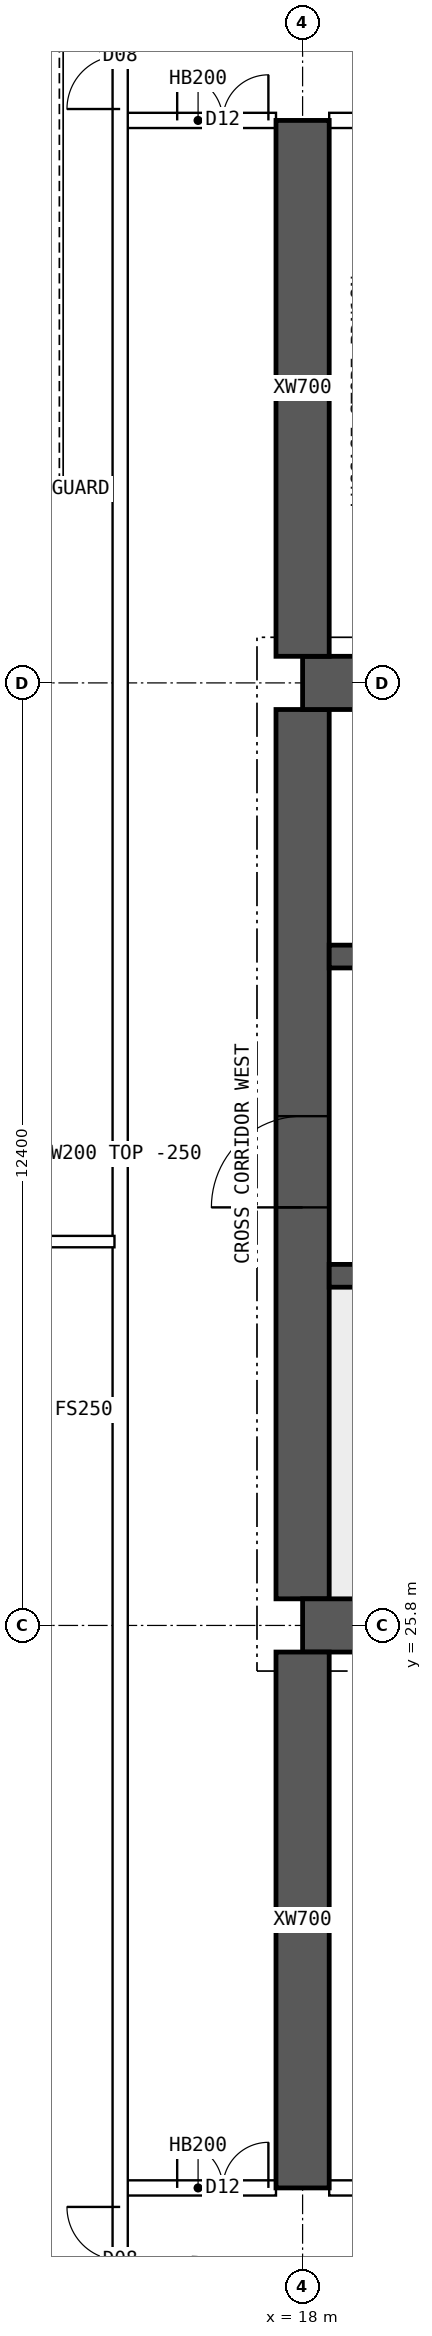
"""IFC4 building model, lengths in metres.
Left out: names, types, materials, properties, quantities, classifications, styles, units other than length and angle.
Written with IfcOpenShell. Run it as: python <this file> out.ifc"""

import sys

from ifc_helpers import new_model, si_unit, direction, frame, frame_2d, origin, place, context, subcontext, project, spatial, polyline, rectangle, outline, extrude, element, fill, save


model = new_model("IFC4")
c1 = context("Model", 3, precision=1e-05, world=origin(), true_north=direction((0.0, 1.0)))
c2 = subcontext(c1, "Body", "Model", "MODEL_VIEW")
j1 = project(units=[si_unit("LENGTHUNIT", "METRE"), si_unit("PLANEANGLEUNIT", "RADIAN")], contexts=[c1])
p1 = place(None, origin())
s1 = spatial("IfcSite", under=j1, at=p1, CompositionType="ELEMENT")
p2 = place(p1, origin())
s2 = spatial("IfcBuilding", under=s1, at=p2, CompositionType="ELEMENT")
p3 = place(p2, frame((0.0, 0.0, 250.3)))
s3 = spatial("IfcBuildingStorey", under=s2, at=p3, CompositionType="ELEMENT", Elevation=250.3)
for number, where, z_axis, x_axis in (
    (1, (18.0, 25.8, 0.0), (0.0, 0.0, 1.0), (1.0, 0.0, 0.0)),
    (2, (18.0, 38.2, 0.0), (0.0, 0.0, 1.0), (1.0, 0.0, 0.0)),
):
    element("IfcWall", number, at=place(p3, frame(where, z_axis=z_axis, x_axis=x_axis)), inside=s3, PredefinedType="SHEAR", context=c2, shape_type="SweptSolid", body=[
        extrude(rectangle(XDim=48.0, YDim=0.7, at=frame_2d((24.0, 0.0))), origin(), (0.0, 0.0, 1.0), 3.75),
    ])
p4 = place(p3, frame((18.0, 26.15, 0.0), z_axis=(0.0, 0.0, 1.0), x_axis=(0.0, 1.0, 0.0)))
e3 = element("IfcWall", 3, at=p4, inside=s3, PredefinedType="SHEAR", context=c2, shape_type="SweptSolid", body=[
    extrude(rectangle(XDim=11.7, YDim=0.7, at=frame_2d((5.85, 0.0))), origin(), (0.0, 0.0, 1.0), 3.75),
])
p5 = place(p4, frame((5.15, 0.0, 0.0)))
e4 = element("IfcOpeningElement", 4, at=p5, cuts=e3, PredefinedType="OPENING", context=c2, shape_type="SweptSolid", body=[
    extrude(rectangle(XDim=1.2, YDim=2.1, at=frame_2d((0.6, 1.05))), frame((0.0, 0.36, 0.0), z_axis=(0.0, -1.0, 0.0), x_axis=(1.0, 0.0, 0.0)), (0.0, 0.0, 1.0), 0.72),
])
p6 = place(p3, frame((18.35, 30.4, 0.0), z_axis=(0.0, 0.0, 1.0), x_axis=(1.0, 0.0, 0.0)))
e5 = element("IfcWall", 5, at=p6, inside=s3, PredefinedType="SHEAR", context=c2, shape_type="SweptSolid", body=[
    extrude(rectangle(XDim=47.3, YDim=0.3, at=frame_2d((23.65, 0.0))), origin(), (0.0, 0.0, 1.0), 3.75),
])
p7 = place(p6, frame((0.4, 0.0, 0.0)))
e6 = element("IfcOpeningElement", 6, at=p7, cuts=e5, PredefinedType="OPENING", context=c2, shape_type="SweptSolid", body=[
    extrude(rectangle(XDim=1.0, YDim=2.1, at=frame_2d((0.5, 1.05))), frame((0.0, 0.16, 0.0), z_axis=(0.0, -1.0, 0.0), x_axis=(1.0, 0.0, 0.0)), (0.0, 0.0, 1.0), 0.32),
])
p8 = place(p6, frame((45.9, 0.0, 0.0)))
e7 = element("IfcOpeningElement", 7, at=p8, cuts=e5, PredefinedType="OPENING", context=c2, shape_type="SweptSolid", body=[
    extrude(rectangle(XDim=1.0, YDim=2.1, at=frame_2d((0.5, 1.05))), frame((0.0, 0.16, 0.0), z_axis=(0.0, -1.0, 0.0), x_axis=(1.0, 0.0, 0.0)), (0.0, 0.0, 1.0), 0.32),
])
p9 = place(p6, frame((8.4, 0.0, 0.0)))
e8 = element("IfcOpeningElement", 8, at=p9, cuts=e5, PredefinedType="OPENING", context=c2, shape_type="SweptSolid", body=[
    extrude(rectangle(XDim=1.1, YDim=2.1, at=frame_2d((0.55, 1.05))), frame((0.0, 0.16, 0.0), z_axis=(0.0, -1.0, 0.0), x_axis=(1.0, 0.0, 0.0)), (0.0, 0.0, 1.0), 0.32),
])
p10 = place(p6, frame((11.0, 0.0, 0.0)))
e9 = element("IfcOpeningElement", 9, at=p10, cuts=e5, PredefinedType="OPENING", context=c2, shape_type="SweptSolid", body=[
    extrude(rectangle(XDim=1.1, YDim=2.1, at=frame_2d((0.55, 1.05))), frame((0.0, 0.16, 0.0), z_axis=(0.0, -1.0, 0.0), x_axis=(1.0, 0.0, 0.0)), (0.0, 0.0, 1.0), 0.32),
])
p11 = place(p6, frame((13.6, 0.0, 0.0)))
e10 = element("IfcOpeningElement", 10, at=p11, cuts=e5, PredefinedType="OPENING", context=c2, shape_type="SweptSolid", body=[
    extrude(rectangle(XDim=1.1, YDim=2.1, at=frame_2d((0.55, 1.05))), frame((0.0, 0.16, 0.0), z_axis=(0.0, -1.0, 0.0), x_axis=(1.0, 0.0, 0.0)), (0.0, 0.0, 1.0), 0.32),
])
p12 = place(p6, frame((16.2, 0.0, 0.0)))
e11 = element("IfcOpeningElement", 11, at=p12, cuts=e5, PredefinedType="OPENING", context=c2, shape_type="SweptSolid", body=[
    extrude(rectangle(XDim=1.1, YDim=2.1, at=frame_2d((0.55, 1.05))), frame((0.0, 0.16, 0.0), z_axis=(0.0, -1.0, 0.0), x_axis=(1.0, 0.0, 0.0)), (0.0, 0.0, 1.0), 0.32),
])
p13 = place(p6, frame((18.975, 0.0, 0.0)))
e12 = element("IfcOpeningElement", 12, at=p13, cuts=e5, PredefinedType="OPENING", context=c2, shape_type="SweptSolid", body=[
    extrude(rectangle(XDim=0.9, YDim=2.1, at=frame_2d((0.45, 1.05))), frame((0.0, 0.16, 0.0), z_axis=(0.0, -1.0, 0.0), x_axis=(1.0, 0.0, 0.0)), (0.0, 0.0, 1.0), 0.32),
])
p14 = place(p6, frame((24.475, 0.0, 0.0)))
e13 = element("IfcOpeningElement", 13, at=p14, cuts=e5, PredefinedType="OPENING", context=c2, shape_type="SweptSolid", body=[
    extrude(rectangle(XDim=0.9, YDim=2.1, at=frame_2d((0.45, 1.05))), frame((0.0, 0.16, 0.0), z_axis=(0.0, -1.0, 0.0), x_axis=(1.0, 0.0, 0.0)), (0.0, 0.0, 1.0), 0.32),
])
p15 = place(p6, frame((30.267, 0.0, 0.0)))
e14 = element("IfcOpeningElement", 14, at=p15, cuts=e5, PredefinedType="OPENING", context=c2, shape_type="SweptSolid", body=[
    extrude(rectangle(XDim=1.1, YDim=2.1, at=frame_2d((0.55, 1.05))), frame((0.0, 0.16, 0.0), z_axis=(0.0, -1.0, 0.0), x_axis=(1.0, 0.0, 0.0)), (0.0, 0.0, 1.0), 0.32),
])
p16 = place(p6, frame((33.8, 0.0, 0.0)))
e15 = element("IfcOpeningElement", 15, at=p16, cuts=e5, PredefinedType="OPENING", context=c2, shape_type="SweptSolid", body=[
    extrude(rectangle(XDim=1.1, YDim=2.1, at=frame_2d((0.55, 1.05))), frame((0.0, 0.16, 0.0), z_axis=(0.0, -1.0, 0.0), x_axis=(1.0, 0.0, 0.0)), (0.0, 0.0, 1.0), 0.32),
])
p17 = place(p6, frame((37.333, 0.0, 0.0)))
e16 = element("IfcOpeningElement", 16, at=p17, cuts=e5, PredefinedType="OPENING", context=c2, shape_type="SweptSolid", body=[
    extrude(rectangle(XDim=1.1, YDim=2.1, at=frame_2d((0.55, 1.05))), frame((0.0, 0.16, 0.0), z_axis=(0.0, -1.0, 0.0), x_axis=(1.0, 0.0, 0.0)), (0.0, 0.0, 1.0), 0.32),
])
p18 = place(p3, frame((18.35, 34.6, 0.0), z_axis=(0.0, 0.0, 1.0), x_axis=(1.0, 0.0, 0.0)))
e17 = element("IfcWall", 17, at=p18, inside=s3, PredefinedType="SHEAR", context=c2, shape_type="SweptSolid", body=[
    extrude(rectangle(XDim=47.3, YDim=0.3, at=frame_2d((23.65, 0.0))), origin(), (0.0, 0.0, 1.0), 3.75),
])
p19 = place(p18, frame((0.9, 0.0, 0.0)))
e18 = element("IfcOpeningElement", 18, at=p19, cuts=e17, PredefinedType="OPENING", context=c2, shape_type="SweptSolid", body=[
    extrude(rectangle(XDim=1.1, YDim=2.1, at=frame_2d((0.55, 1.05))), frame((0.0, 0.16, 0.0), z_axis=(0.0, -1.0, 0.0), x_axis=(1.0, 0.0, 0.0)), (0.0, 0.0, 1.0), 0.32),
])
p20 = place(p18, frame((45.3, 0.0, 0.0)))
e19 = element("IfcOpeningElement", 19, at=p20, cuts=e17, PredefinedType="OPENING", context=c2, shape_type="SweptSolid", body=[
    extrude(rectangle(XDim=1.1, YDim=2.1, at=frame_2d((0.55, 1.05))), frame((0.0, 0.16, 0.0), z_axis=(0.0, -1.0, 0.0), x_axis=(1.0, 0.0, 0.0)), (0.0, 0.0, 1.0), 0.32),
])
p21 = place(p18, frame((4.25, 0.0, 0.0)))
e20 = element("IfcOpeningElement", 20, at=p21, cuts=e17, PredefinedType="OPENING", context=c2, shape_type="SweptSolid", body=[
    extrude(rectangle(XDim=0.9, YDim=2.1, at=frame_2d((0.45, 1.05))), frame((0.0, 0.16, 0.0), z_axis=(0.0, -1.0, 0.0), x_axis=(1.0, 0.0, 0.0)), (0.0, 0.0, 1.0), 0.32),
])
p22 = place(p18, frame((42.15, 0.0, 0.0)))
e21 = element("IfcOpeningElement", 21, at=p22, cuts=e17, PredefinedType="OPENING", context=c2, shape_type="SweptSolid", body=[
    extrude(rectangle(XDim=0.9, YDim=2.1, at=frame_2d((0.45, 1.05))), frame((0.0, 0.16, 0.0), z_axis=(0.0, -1.0, 0.0), x_axis=(1.0, 0.0, 0.0)), (0.0, 0.0, 1.0), 0.32),
])
p23 = place(p18, frame((9.025, 0.0, 0.0)))
e22 = element("IfcOpeningElement", 22, at=p23, cuts=e17, PredefinedType="OPENING", context=c2, shape_type="SweptSolid", body=[
    extrude(rectangle(XDim=0.9, YDim=2.1, at=frame_2d((0.45, 1.05))), frame((0.0, 0.16, 0.0), z_axis=(0.0, -1.0, 0.0), x_axis=(1.0, 0.0, 0.0)), (0.0, 0.0, 1.0), 0.32),
])
p24 = place(p18, frame((12.999, 0.0, 0.0)))
e23 = element("IfcOpeningElement", 23, at=p24, cuts=e17, PredefinedType="OPENING", context=c2, shape_type="SweptSolid", body=[
    extrude(rectangle(XDim=0.9, YDim=2.1, at=frame_2d((0.45, 1.05))), frame((0.0, 0.16, 0.0), z_axis=(0.0, -1.0, 0.0), x_axis=(1.0, 0.0, 0.0)), (0.0, 0.0, 1.0), 0.32),
])
p25 = place(p18, frame((16.646, 0.0, 0.0)))
e24 = element("IfcOpeningElement", 24, at=p25, cuts=e17, PredefinedType="OPENING", context=c2, shape_type="SweptSolid", body=[
    extrude(rectangle(XDim=0.9, YDim=2.1, at=frame_2d((0.45, 1.05))), frame((0.0, 0.16, 0.0), z_axis=(0.0, -1.0, 0.0), x_axis=(1.0, 0.0, 0.0)), (0.0, 0.0, 1.0), 0.32),
])
p26 = place(p18, frame((20.405, 0.0, 0.0)))
e25 = element("IfcOpeningElement", 25, at=p26, cuts=e17, PredefinedType="OPENING", context=c2, shape_type="SweptSolid", body=[
    extrude(rectangle(XDim=0.9, YDim=2.1, at=frame_2d((0.45, 1.05))), frame((0.0, 0.16, 0.0), z_axis=(0.0, -1.0, 0.0), x_axis=(1.0, 0.0, 0.0)), (0.0, 0.0, 1.0), 0.32),
])
p27 = place(p18, frame((24.811, 0.0, 0.0)))
e26 = element("IfcOpeningElement", 26, at=p27, cuts=e17, PredefinedType="OPENING", context=c2, shape_type="SweptSolid", body=[
    extrude(rectangle(XDim=0.9, YDim=2.1, at=frame_2d((0.45, 1.05))), frame((0.0, 0.16, 0.0), z_axis=(0.0, -1.0, 0.0), x_axis=(1.0, 0.0, 0.0)), (0.0, 0.0, 1.0), 0.32),
])
p28 = place(p18, frame((27.608, 0.0, 0.0)))
e27 = element("IfcOpeningElement", 27, at=p28, cuts=e17, PredefinedType="OPENING", context=c2, shape_type="SweptSolid", body=[
    extrude(rectangle(XDim=0.9, YDim=2.1, at=frame_2d((0.45, 1.05))), frame((0.0, 0.16, 0.0), z_axis=(0.0, -1.0, 0.0), x_axis=(1.0, 0.0, 0.0)), (0.0, 0.0, 1.0), 0.32),
])
p29 = place(p18, frame((29.981, 0.0, 0.0)))
e28 = element("IfcOpeningElement", 28, at=p29, cuts=e17, PredefinedType="OPENING", context=c2, shape_type="SweptSolid", body=[
    extrude(rectangle(XDim=0.9, YDim=2.1, at=frame_2d((0.45, 1.05))), frame((0.0, 0.16, 0.0), z_axis=(0.0, -1.0, 0.0), x_axis=(1.0, 0.0, 0.0)), (0.0, 0.0, 1.0), 0.32),
])
p30 = place(p18, frame((35.451, 0.0, 0.0)))
e29 = element("IfcOpeningElement", 29, at=p30, cuts=e17, PredefinedType="OPENING", context=c2, shape_type="SweptSolid", body=[
    extrude(rectangle(XDim=0.9, YDim=2.1, at=frame_2d((0.45, 1.05))), frame((0.0, 0.16, 0.0), z_axis=(0.0, -1.0, 0.0), x_axis=(1.0, 0.0, 0.0)), (0.0, 0.0, 1.0), 0.32),
])
for number, where, z_axis, x_axis in (
    (30, (18.0, 18.4, 0.0), (0.0, 0.0, 1.0), (0.0, 1.0, 0.0)),
    (31, (18.0, 38.55, 0.0), (0.0, 0.0, 1.0), (0.0, 1.0, 0.0)),
):
    element("IfcWall", number, at=place(p3, frame(where, z_axis=z_axis, x_axis=x_axis)), inside=s3, PredefinedType="SHEAR", context=c2, shape_type="SweptSolid", body=[
        extrude(rectangle(XDim=7.05, YDim=0.7, at=frame_2d((3.525, 0.0))), origin(), (0.0, 0.0, 1.0), 3.75),
    ])
p31 = place(p3, frame((15.6, 18.4, 0.0), z_axis=(0.0, 0.0, 1.0), x_axis=(1.0, 0.0, 0.0)))
e32 = element("IfcWall", 32, at=p31, inside=s3, PredefinedType="SOLIDWALL", context=c2, shape_type="SweptSolid", body=[
    extrude(rectangle(XDim=2.05, YDim=0.2, at=frame_2d((1.025, 0.0))), origin(), (0.0, 0.0, 1.0), 3.5),
])
p32 = place(p31, frame((0.75, 0.0, 0.0)))
e33 = element("IfcOpeningElement", 33, at=p32, cuts=e32, PredefinedType="OPENING", context=c2, shape_type="SweptSolid", body=[
    extrude(rectangle(XDim=1.2, YDim=2.1, at=frame_2d((0.6, 1.05))), frame((0.0, 0.11, 0.0), z_axis=(0.0, -1.0, 0.0), x_axis=(1.0, 0.0, 0.0)), (0.0, 0.0, 1.0), 0.22),
])
p33 = place(p3, frame((18.35, 18.4, 0.0), z_axis=(0.0, 0.0, 1.0), x_axis=(1.0, 0.0, 0.0)))
e34 = element("IfcWall", 34, at=p33, inside=s3, PredefinedType="SOLIDWALL", context=c2, shape_type="SweptSolid", body=[
    extrude(rectangle(XDim=5.3, YDim=0.2, at=frame_2d((2.65, 0.0))), origin(), (0.0, 0.0, 1.0), 3.5),
])
p34 = place(p33, frame((0.35, 0.0, 0.0)))
e35 = element("IfcOpeningElement", 35, at=p34, cuts=e34, PredefinedType="OPENING", context=c2, shape_type="SweptSolid", body=[
    extrude(rectangle(XDim=0.9, YDim=2.1, at=frame_2d((0.45, 1.05))), frame((0.0, 0.11, 0.0), z_axis=(0.0, -1.0, 0.0), x_axis=(1.0, 0.0, 0.0)), (0.0, 0.0, 1.0), 0.22),
])
p35 = place(p33, frame((3.185, 0.0, 0.0)))
e36 = element("IfcOpeningElement", 36, at=p35, cuts=e34, PredefinedType="OPENING", context=c2, shape_type="SweptSolid", body=[
    extrude(rectangle(XDim=0.9, YDim=2.1, at=frame_2d((0.45, 1.05))), frame((0.0, 0.11, 0.0), z_axis=(0.0, -1.0, 0.0), x_axis=(1.0, 0.0, 0.0)), (0.0, 0.0, 1.0), 0.22),
])
p36 = place(p3, frame((15.6, 45.6, 0.0), z_axis=(0.0, 0.0, 1.0), x_axis=(1.0, 0.0, 0.0)))
e37 = element("IfcWall", 37, at=p36, inside=s3, PredefinedType="SOLIDWALL", context=c2, shape_type="SweptSolid", body=[
    extrude(rectangle(XDim=2.05, YDim=0.2, at=frame_2d((1.025, 0.0))), origin(), (0.0, 0.0, 1.0), 3.5),
])
p37 = place(p36, frame((0.75, 0.0, 0.0)))
e38 = element("IfcOpeningElement", 38, at=p37, cuts=e37, PredefinedType="OPENING", context=c2, shape_type="SweptSolid", body=[
    extrude(rectangle(XDim=1.2, YDim=2.1, at=frame_2d((0.6, 1.05))), frame((0.0, 0.11, 0.0), z_axis=(0.0, -1.0, 0.0), x_axis=(1.0, 0.0, 0.0)), (0.0, 0.0, 1.0), 0.22),
])
p38 = place(p3, frame((18.35, 45.6, 0.0), z_axis=(0.0, 0.0, 1.0), x_axis=(1.0, 0.0, 0.0)))
e39 = element("IfcWall", 39, at=p38, inside=s3, PredefinedType="SOLIDWALL", context=c2, shape_type="SweptSolid", body=[
    extrude(rectangle(XDim=5.3, YDim=0.2, at=frame_2d((2.65, 0.0))), origin(), (0.0, 0.0, 1.0), 3.5),
])
p39 = place(p38, frame((0.35, 0.0, 0.0)))
e40 = element("IfcOpeningElement", 40, at=p39, cuts=e39, PredefinedType="OPENING", context=c2, shape_type="SweptSolid", body=[
    extrude(rectangle(XDim=0.9, YDim=2.1, at=frame_2d((0.45, 1.05))), frame((0.0, 0.11, 0.0), z_axis=(0.0, -1.0, 0.0), x_axis=(1.0, 0.0, 0.0)), (0.0, 0.0, 1.0), 0.22),
])
p40 = place(p38, frame((2.415, 0.0, 0.0)))
e41 = element("IfcOpeningElement", 41, at=p40, cuts=e39, PredefinedType="OPENING", context=c2, shape_type="SweptSolid", body=[
    extrude(rectangle(XDim=0.9, YDim=2.1, at=frame_2d((0.45, 1.05))), frame((0.0, 0.11, 0.0), z_axis=(0.0, -1.0, 0.0), x_axis=(1.0, 0.0, 0.0)), (0.0, 0.0, 1.0), 0.22),
])
p41 = place(p3, frame((8.705, 30.85, 0.0), z_axis=(0.0, 0.0, 1.0), x_axis=(1.0, 0.0, 0.0)))
e42 = element("IfcWall", 42, at=p41, inside=s3, PredefinedType="PARTITIONING", context=c2, shape_type="SweptSolid", body=[
    extrude(outline(polyline([(0.0, 0.0), (6.82, 0.0), (6.82, 3.5), (3.597, 3.5), (3.595, 3.05), (2.997, 3.05), (2.995, 3.5), (0.0, 3.5), (0.0, 0.0)])), frame((0.0, 0.075, 0.0), z_axis=(0.0, -1.0, 0.0), x_axis=(1.0, 0.0, 0.0)), (0.0, 0.0, 1.0), 0.15),
])
p42 = place(p3, frame((15.6, 11.646, 0.0), z_axis=(0.0, 0.0, 1.0), x_axis=(0.0, 1.0, 0.0)))
e43 = element("IfcWall", 43, at=p42, inside=s3, PredefinedType="SOLIDWALL", context=c2, shape_type="SweptSolid", body=[
    extrude(rectangle(XDim=40.708, YDim=0.2, at=frame_2d((20.354, 0.0))), origin(), (0.0, 0.0, 1.0), 3.5),
])
p43 = place(p42, frame((5.104, 0.0, 0.0)))
e44 = element("IfcOpeningElement", 44, at=p43, cuts=e43, PredefinedType="OPENING", context=c2, shape_type="SweptSolid", body=[
    extrude(rectangle(XDim=1.4, YDim=2.1, at=frame_2d((0.7, 1.05))), frame((0.0, 0.11, 0.0), z_axis=(0.0, -1.0, 0.0), x_axis=(1.0, 0.0, 0.0)), (0.0, 0.0, 1.0), 0.22),
])
p44 = place(p42, frame((34.104, 0.0, 0.0)))
e45 = element("IfcOpeningElement", 45, at=p44, cuts=e43, PredefinedType="OPENING", context=c2, shape_type="SweptSolid", body=[
    extrude(rectangle(XDim=1.4, YDim=2.1, at=frame_2d((0.7, 1.05))), frame((0.0, 0.11, 0.0), z_axis=(0.0, -1.0, 0.0), x_axis=(1.0, 0.0, 0.0)), (0.0, 0.0, 1.0), 0.22),
])
p45 = place(p5, origin())
e46 = element("IfcDoor", 46, at=p45, inside=s3, OperationType="SINGLE_SWING_LEFT", PredefinedType="DOOR", context=c2, shape_type="SweptSolid", body=[
    extrude(rectangle(XDim=1.2, YDim=2.1, at=frame_2d((0.6, 1.05))), frame((0.0, 0.025, 0.0), z_axis=(0.0, -1.0, 0.0), x_axis=(1.0, 0.0, 0.0)), (0.0, 0.0, 1.0), 0.05),
])
fill(e4, e46)
p46 = place(p32, origin())
e47 = element("IfcDoor", 47, at=p46, inside=s3, OperationType="DOUBLE_DOOR_SINGLE_SWING", PredefinedType="DOOR", context=c2, shape_type="SweptSolid", body=[
    extrude(rectangle(XDim=1.2, YDim=2.1, at=frame_2d((0.6, 1.05))), frame((0.0, 0.025, 0.0), z_axis=(0.0, -1.0, 0.0), x_axis=(1.0, 0.0, 0.0)), (0.0, 0.0, 1.0), 0.05),
])
fill(e33, e47)
p47 = place(p37, origin())
e48 = element("IfcDoor", 48, at=p47, inside=s3, OperationType="DOUBLE_DOOR_SINGLE_SWING", PredefinedType="DOOR", context=c2, shape_type="SweptSolid", body=[
    extrude(rectangle(XDim=1.2, YDim=2.1, at=frame_2d((0.6, 1.05))), frame((0.0, 0.025, 0.0), z_axis=(0.0, -1.0, 0.0), x_axis=(1.0, 0.0, 0.0)), (0.0, 0.0, 1.0), 0.05),
])
fill(e38, e48)
p48 = place(p43, origin())
e49 = element("IfcDoor", 49, at=p48, inside=s3, OperationType="DOUBLE_DOOR_SINGLE_SWING", PredefinedType="DOOR", context=c2, shape_type="SweptSolid", body=[
    extrude(rectangle(XDim=1.4, YDim=2.1, at=frame_2d((0.7, 1.05))), frame((0.0, 0.025, 0.0), z_axis=(0.0, -1.0, 0.0), x_axis=(1.0, 0.0, 0.0)), (0.0, 0.0, 1.0), 0.05),
])
fill(e44, e49)
p49 = place(p44, origin())
e50 = element("IfcDoor", 50, at=p49, inside=s3, OperationType="DOUBLE_DOOR_SINGLE_SWING", PredefinedType="DOOR", context=c2, shape_type="SweptSolid", body=[
    extrude(rectangle(XDim=1.4, YDim=2.1, at=frame_2d((0.7, 1.05))), frame((0.0, 0.025, 0.0), z_axis=(0.0, -1.0, 0.0), x_axis=(1.0, 0.0, 0.0)), (0.0, 0.0, 1.0), 0.05),
])
fill(e45, e50)
save(model, sys.argv[1])
